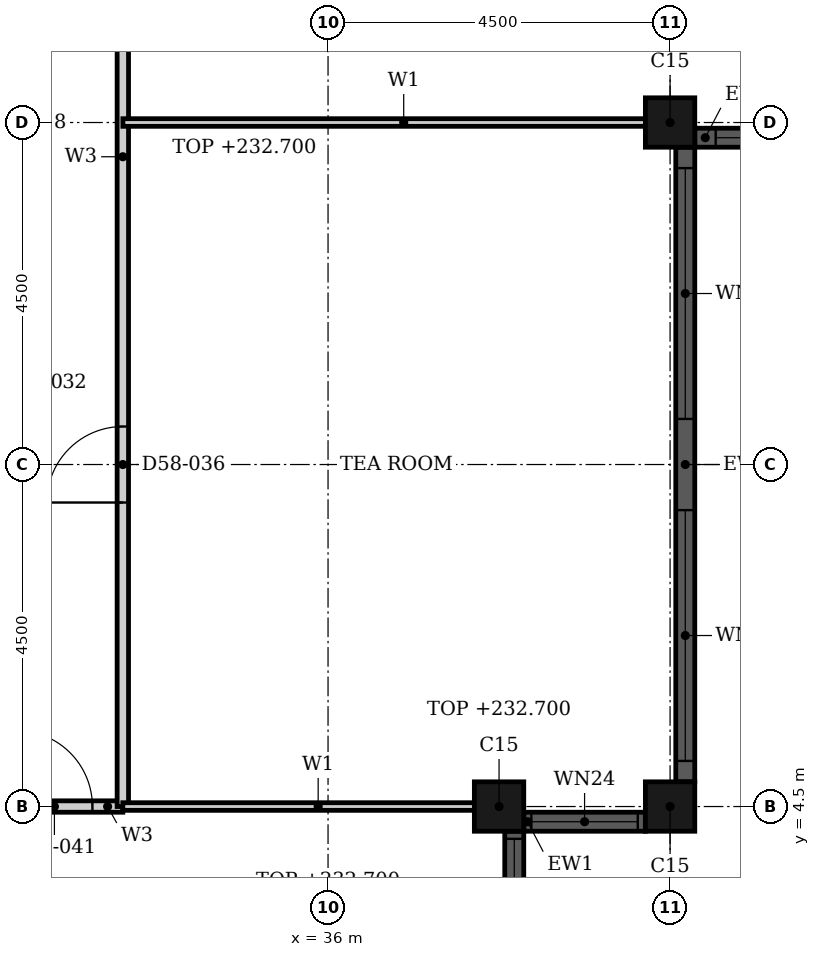
"""IFC4 building model, lengths in metres.
Left out: names, types, materials, properties, quantities, classifications, styles, units other than length and angle.
Written with IfcOpenShell. Run it as: python <this file> out.ifc"""

import sys

from ifc_helpers import new_model, si_unit, direction, frame, frame_2d, origin, origin_2d, place, context, subcontext, project, spatial, rectangle, hollow_rectangle, extrude, element, fill, save


model = new_model("IFC4")
c1 = context("Model", 3, precision=1e-05, world=origin(), true_north=direction((0.0, 1.0)))
c2 = subcontext(c1, "Body", "Model", "MODEL_VIEW")
j1 = project(units=[si_unit("LENGTHUNIT", "METRE"), si_unit("PLANEANGLEUNIT", "RADIAN")], contexts=[c1])
p1 = place(None, origin())
s1 = spatial("IfcSite", under=j1, at=p1, CompositionType="ELEMENT")
p2 = place(p1, origin())
s2 = spatial("IfcBuilding", under=s1, at=p2, CompositionType="ELEMENT")
p3 = place(p2, frame((0.0, 0.0, 229.4)))
s3 = spatial("IfcBuildingStorey", under=s2, at=p3, CompositionType="ELEMENT", Elevation=229.4)
for number, where, z_axis, x_axis in (
    (1, (40.5, 13.5, 0.0), (0.0, 0.0, 1.0), (1.0, 0.0, 0.0)),
    (2, (38.25, 4.5, 0.0), (0.0, 0.0, 1.0), (1.0, 0.0, 0.0)),
    (3, (40.5, 4.5, 0.0), (0.0, 0.0, 1.0), (1.0, 0.0, 0.0)),
):
    element("IfcColumn", number, at=place(p3, frame(where, z_axis=z_axis, x_axis=x_axis)), inside=s3, PredefinedType="COLUMN", context=c2, shape_type="SweptSolid", body=[
        extrude(hollow_rectangle(XDim=0.65, YDim=0.65, WallThickness=0.021, at=origin_2d()), origin(), (0.0, 0.0, 1.0), 3.3),
    ])
p4 = place(p3, frame((40.825, 13.3, 0.0), z_axis=(0.0, 0.0, 1.0), x_axis=(1.0, 0.0, 0.0)))
e4 = element("IfcWall", 4, at=p4, inside=s3, PredefinedType="SOLIDWALL", context=c2, shape_type="SweptSolid", body=[
    extrude(rectangle(XDim=3.85, YDim=0.25, at=frame_2d((1.925, 0.0))), origin(), (0.0, 0.0, 1.0), 3.7),
])
p5 = place(p4, frame((0.275, 0.0, 0.45)))
e5 = element("IfcOpeningElement", 5, at=p5, cuts=e4, PredefinedType="OPENING", context=c2, shape_type="SweptSolid", body=[
    extrude(rectangle(XDim=3.3, YDim=1.9, at=frame_2d((1.65, 0.95))), frame((0.0, 0.135, 0.0), z_axis=(0.0, -1.0, 0.0), x_axis=(1.0, 0.0, 0.0)), (0.0, 0.0, 1.0), 0.27),
])
p6 = place(p3, frame((38.45, 2.575, 0.0), z_axis=(0.0, 0.0, 1.0), x_axis=(0.0, 1.0, 0.0)))
e6 = element("IfcWall", 6, at=p6, inside=s3, PredefinedType="SOLIDWALL", context=c2, shape_type="SweptSolid", body=[
    extrude(rectangle(XDim=1.6, YDim=0.25, at=frame_2d((0.8, 0.0))), origin(), (0.0, 0.0, 1.0), 3.7),
])
p7 = place(p6, frame((0.1, 0.0, 0.9)))
e7 = element("IfcOpeningElement", 7, at=p7, cuts=e6, PredefinedType="OPENING", context=c2, shape_type="SweptSolid", body=[
    extrude(rectangle(XDim=1.4, YDim=1.75, at=frame_2d((0.7, 0.875))), frame((0.0, 0.135, 0.0), z_axis=(0.0, -1.0, 0.0), x_axis=(1.0, 0.0, 0.0)), (0.0, 0.0, 1.0), 0.27),
])
p8 = place(p3, frame((38.575, 4.3, 0.0), z_axis=(0.0, 0.0, 1.0), x_axis=(1.0, 0.0, 0.0)))
e8 = element("IfcWall", 8, at=p8, inside=s3, PredefinedType="SOLIDWALL", context=c2, shape_type="SweptSolid", body=[
    extrude(rectangle(XDim=1.6, YDim=0.25, at=frame_2d((0.8, 0.0))), origin(), (0.0, 0.0, 1.0), 3.7),
])
p9 = place(p8, frame((0.1, 0.0, 0.9)))
e9 = element("IfcOpeningElement", 9, at=p9, cuts=e8, PredefinedType="OPENING", context=c2, shape_type="SweptSolid", body=[
    extrude(rectangle(XDim=1.4, YDim=1.75, at=frame_2d((0.7, 0.875))), frame((0.0, 0.135, 0.0), z_axis=(0.0, -1.0, 0.0), x_axis=(1.0, 0.0, 0.0)), (0.0, 0.0, 1.0), 0.27),
])
p10 = place(p3, frame((40.7, 4.825, 0.0), z_axis=(0.0, 0.0, 1.0), x_axis=(0.0, 1.0, 0.0)))
e10 = element("IfcWall", 10, at=p10, inside=s3, PredefinedType="SOLIDWALL", context=c2, shape_type="SweptSolid", body=[
    extrude(rectangle(XDim=8.35, YDim=0.25, at=frame_2d((4.175, 0.0))), origin(), (0.0, 0.0, 1.0), 3.7),
])
p11 = place(p10, frame((0.275, 0.0, 0.45)))
e11 = element("IfcOpeningElement", 11, at=p11, cuts=e10, PredefinedType="OPENING", context=c2, shape_type="SweptSolid", body=[
    extrude(rectangle(XDim=3.3, YDim=2.2, at=frame_2d((1.65, 1.1))), frame((0.0, 0.135, 0.0), z_axis=(0.0, -1.0, 0.0), x_axis=(1.0, 0.0, 0.0)), (0.0, 0.0, 1.0), 0.27),
])
p12 = place(p10, frame((4.775, 0.0, 0.45)))
e12 = element("IfcOpeningElement", 12, at=p12, cuts=e10, PredefinedType="OPENING", context=c2, shape_type="SweptSolid", body=[
    extrude(rectangle(XDim=3.3, YDim=2.2, at=frame_2d((1.65, 1.1))), frame((0.0, 0.135, 0.0), z_axis=(0.0, -1.0, 0.0), x_axis=(1.0, 0.0, 0.0)), (0.0, 0.0, 1.0), 0.27),
])
p13 = place(p3, frame((31.5, 4.5, 0.0), z_axis=(0.0, 0.0, 1.0), x_axis=(1.0, 0.0, 0.0)))
e13 = element("IfcWall", 13, at=p13, inside=s3, PredefinedType="PARTITIONING", context=c2, shape_type="SweptSolid", body=[
    extrude(rectangle(XDim=1.8, YDim=0.15, at=frame_2d((0.9, 0.0))), origin(), (0.0, 0.0, 1.0), 3.3),
])
p14 = place(p13, frame((0.4, 0.0, 0.0)))
e14 = element("IfcOpeningElement", 14, at=p14, cuts=e13, PredefinedType="OPENING", context=c2, shape_type="SweptSolid", body=[
    extrude(rectangle(XDim=1.0, YDim=2.1, at=frame_2d((0.5, 1.05))), frame((0.0, 0.085, 0.0), z_axis=(0.0, -1.0, 0.0), x_axis=(1.0, 0.0, 0.0)), (0.0, 0.0, 1.0), 0.17),
])
p15 = place(p3, frame((33.3, 4.5, 0.0), z_axis=(0.0, 0.0, 1.0), x_axis=(0.0, 1.0, 0.0)))
e15 = element("IfcWall", 15, at=p15, inside=s3, PredefinedType="PARTITIONING", context=c2, shape_type="SweptSolid", body=[
    extrude(rectangle(XDim=16.199, YDim=0.15, at=frame_2d((8.1, 0.0))), origin(), (0.0, 0.0, 1.0), 3.3),
])
p16 = place(p15, frame((12.099, 0.0, 0.0)))
e16 = element("IfcOpeningElement", 16, at=p16, cuts=e15, PredefinedType="OPENING", context=c2, shape_type="SweptSolid", body=[
    extrude(rectangle(XDim=1.0, YDim=2.2, at=frame_2d((0.5, 1.1))), frame((0.0, 0.085, 0.0), z_axis=(0.0, -1.0, 0.0), x_axis=(1.0, 0.0, 0.0)), (0.0, 0.0, 1.0), 0.17),
])
p17 = place(p15, frame((4.0, 0.0, 0.0)))
e17 = element("IfcOpeningElement", 17, at=p17, cuts=e15, PredefinedType="OPENING", context=c2, shape_type="SweptSolid", body=[
    extrude(rectangle(XDim=1.0, YDim=2.1, at=frame_2d((0.5, 1.05))), frame((0.0, 0.085, 0.0), z_axis=(0.0, -1.0, 0.0), x_axis=(1.0, 0.0, 0.0)), (0.0, 0.0, 1.0), 0.17),
])
p18 = place(p3, frame((33.301, 13.5, 0.0), z_axis=(0.0, 0.0, 1.0), x_axis=(1.0, 0.0, 0.0)))
e18 = element("IfcWall", 18, at=p18, inside=s3, PredefinedType="PARTITIONING", context=c2, shape_type="SweptSolid", body=[
    extrude(rectangle(XDim=7.389, YDim=0.1, at=frame_2d((3.694, 0.0))), origin(), (0.0, 0.0, 1.0), 2.368),
])
p19 = place(p3, frame((33.3, 4.5, 0.0), z_axis=(0.0, 0.0, 1.0), x_axis=(1.0, 0.0, 0.0)))
e19 = element("IfcWall", 19, at=p19, inside=s3, PredefinedType="PARTITIONING", context=c2, shape_type="SweptSolid", body=[
    extrude(rectangle(XDim=5.14, YDim=0.1, at=frame_2d((2.57, 0.0))), origin(), (0.0, 0.0, 1.0), 3.3),
])
p20 = place(p5, origin())
e20 = element("IfcWindow", 20, at=p20, inside=s3, PartitioningType="SINGLE_PANEL", PredefinedType="WINDOW", context=c2, shape_type="SweptSolid", body=[
    extrude(rectangle(XDim=3.3, YDim=1.9, at=frame_2d((1.65, 0.95))), frame((0.0, 0.03, 0.0), z_axis=(0.0, -1.0, 0.0), x_axis=(1.0, 0.0, 0.0)), (0.0, 0.0, 1.0), 0.06),
])
fill(e5, e20)
p21 = place(p7, origin())
e21 = element("IfcWindow", 21, at=p21, inside=s3, PartitioningType="SINGLE_PANEL", PredefinedType="WINDOW", context=c2, shape_type="SweptSolid", body=[
    extrude(rectangle(XDim=1.4, YDim=1.75, at=frame_2d((0.7, 0.875))), frame((0.0, 0.03, 0.0), z_axis=(0.0, -1.0, 0.0), x_axis=(1.0, 0.0, 0.0)), (0.0, 0.0, 1.0), 0.06),
])
fill(e7, e21)
p22 = place(p9, origin())
e22 = element("IfcWindow", 22, at=p22, inside=s3, PartitioningType="SINGLE_PANEL", PredefinedType="WINDOW", context=c2, shape_type="SweptSolid", body=[
    extrude(rectangle(XDim=1.4, YDim=1.75, at=frame_2d((0.7, 0.875))), frame((0.0, 0.03, 0.0), z_axis=(0.0, -1.0, 0.0), x_axis=(1.0, 0.0, 0.0)), (0.0, 0.0, 1.0), 0.06),
])
fill(e9, e22)
p23 = place(p11, origin())
e23 = element("IfcWindow", 23, at=p23, inside=s3, PartitioningType="SINGLE_PANEL", PredefinedType="WINDOW", context=c2, shape_type="SweptSolid", body=[
    extrude(rectangle(XDim=3.3, YDim=2.2, at=frame_2d((1.65, 1.1))), frame((0.0, 0.03, 0.0), z_axis=(0.0, -1.0, 0.0), x_axis=(1.0, 0.0, 0.0)), (0.0, 0.0, 1.0), 0.06),
])
fill(e11, e23)
p24 = place(p12, origin())
e24 = element("IfcWindow", 24, at=p24, inside=s3, PartitioningType="SINGLE_PANEL", PredefinedType="WINDOW", context=c2, shape_type="SweptSolid", body=[
    extrude(rectangle(XDim=3.3, YDim=2.2, at=frame_2d((1.65, 1.1))), frame((0.0, 0.03, 0.0), z_axis=(0.0, -1.0, 0.0), x_axis=(1.0, 0.0, 0.0)), (0.0, 0.0, 1.0), 0.06),
])
fill(e12, e24)
p25 = place(p17, origin())
e25 = element("IfcDoor", 25, at=p25, inside=s3, OperationType="SINGLE_SWING_LEFT", PredefinedType="DOOR", context=c2, shape_type="SweptSolid", body=[
    extrude(rectangle(XDim=1.0, YDim=2.1, at=frame_2d((0.5, 1.05))), frame((0.0, 0.025, 0.0), z_axis=(0.0, -1.0, 0.0), x_axis=(1.0, 0.0, 0.0)), (0.0, 0.0, 1.0), 0.05),
])
fill(e17, e25)
p26 = place(p14, origin())
e26 = element("IfcDoor", 26, at=p26, inside=s3, OperationType="SINGLE_SWING_RIGHT", PredefinedType="DOOR", context=c2, shape_type="SweptSolid", body=[
    extrude(rectangle(XDim=1.0, YDim=2.1, at=frame_2d((0.5, 1.05))), frame((0.0, 0.025, 0.0), z_axis=(0.0, -1.0, 0.0), x_axis=(1.0, 0.0, 0.0)), (0.0, 0.0, 1.0), 0.05),
])
fill(e14, e26)
save(model, sys.argv[1])
